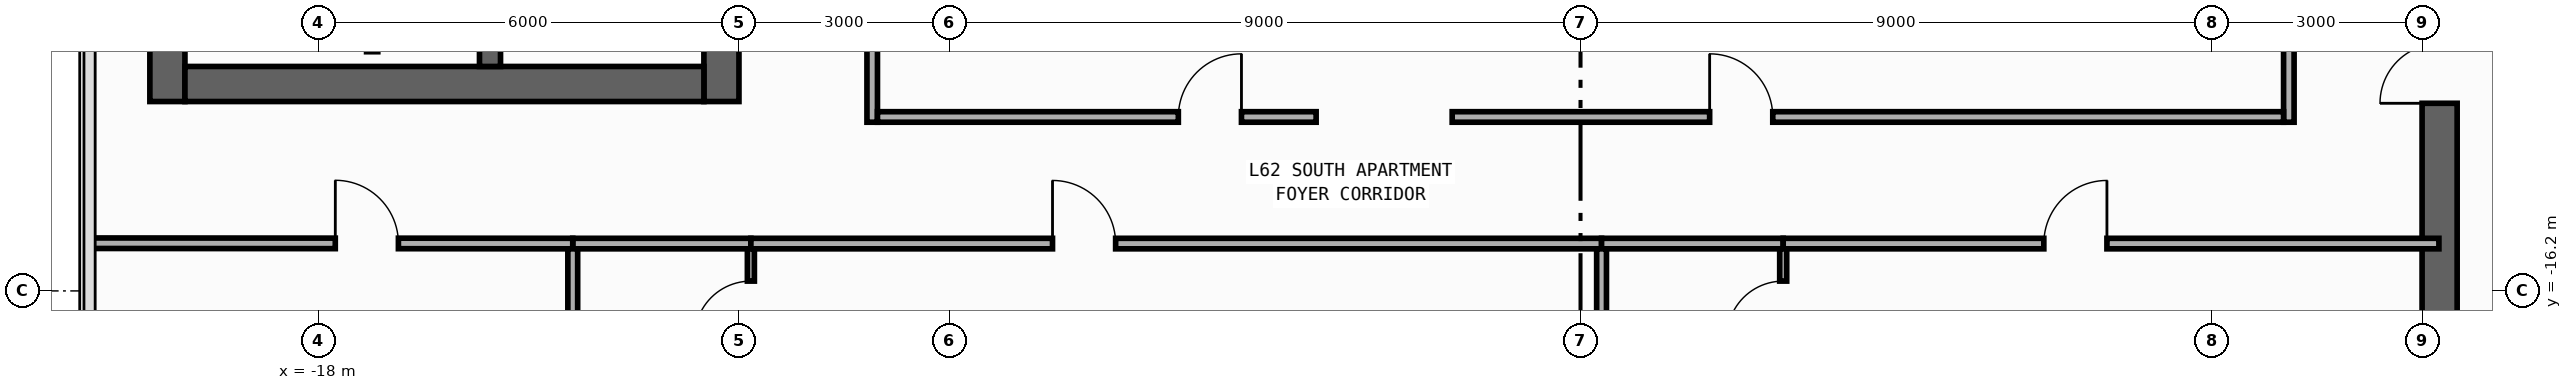
"""IFC4 building model, lengths in metres.
Left out: names, types, materials, properties, quantities, classifications, styles, units other than length and angle.
Written with IfcOpenShell. Run it as: python <this file> out.ifc"""

import sys

from ifc_helpers import new_model, si_unit, direction, frame, frame_2d, origin, place, context, subcontext, project, spatial, rectangle, extrude, element, fill, save


model = new_model("IFC4")
c1 = context("Model", 3, precision=1e-05, world=origin(), true_north=direction((0.0, 1.0)))
c2 = subcontext(c1, "Body", "Model", "MODEL_VIEW")
j1 = project(units=[si_unit("LENGTHUNIT", "METRE"), si_unit("PLANEANGLEUNIT", "RADIAN")], contexts=[c1])
p1 = place(None, origin())
s1 = spatial("IfcSite", under=j1, at=p1, CompositionType="ELEMENT")
p2 = place(p1, origin())
s2 = spatial("IfcBuilding", under=s1, at=p2, CompositionType="ELEMENT")
p3 = place(p2, frame((0.0, 0.0, 262.0)))
s3 = spatial("IfcBuildingStorey", under=s2, at=p3, CompositionType="ELEMENT", Elevation=262.0)
p4 = place(p3, frame((-20.15, -13.5, 0.0), z_axis=(0.0, 0.0, 1.0), x_axis=(0.0, 1.0, 0.0)))
e1 = element("IfcWall", 1, at=p4, inside=s3, PredefinedType="SHEAR", context=c2, shape_type="SweptSolid", body=[
    extrude(rectangle(XDim=27.0, YDim=0.5, at=frame_2d((13.5, 0.0))), origin(), (0.0, 0.0, 1.0), 3.34),
])
p5 = place(p3, frame((-12.25, -13.5, 0.0), z_axis=(0.0, 0.0, 1.0), x_axis=(0.0, 1.0, 0.0)))
e2 = element("IfcWall", 2, at=p5, inside=s3, PredefinedType="SHEAR", context=c2, shape_type="SweptSolid", body=[
    extrude(rectangle(XDim=27.0, YDim=0.5, at=frame_2d((13.5, 0.0))), origin(), (0.0, 0.0, 1.0), 3.34),
])
p6 = place(p5, frame((15.175, 0.0, 0.0)))
e3 = element("IfcOpeningElement", 3, at=p6, cuts=e2, PredefinedType="OPENING", context=c2, shape_type="SweptSolid", body=[
    extrude(rectangle(XDim=0.85, YDim=2.1, at=frame_2d((0.425, 1.05))), frame((0.0, 0.26, 0.0), z_axis=(0.0, -1.0, 0.0), x_axis=(1.0, 0.0, 0.0)), (0.0, 0.0, 1.0), 0.52),
])
p7 = place(p5, frame((21.275, 0.0, 0.0)))
e4 = element("IfcOpeningElement", 4, at=p7, cuts=e2, PredefinedType="OPENING", context=c2, shape_type="SweptSolid", body=[
    extrude(rectangle(XDim=0.85, YDim=2.1, at=frame_2d((0.425, 1.05))), frame((0.0, 0.26, 0.0), z_axis=(0.0, -1.0, 0.0), x_axis=(1.0, 0.0, 0.0)), (0.0, 0.0, 1.0), 0.52),
])
p8 = place(p5, frame((4.275, 0.0, 0.0)))
e5 = element("IfcOpeningElement", 5, at=p8, cuts=e2, PredefinedType="OPENING", context=c2, shape_type="SweptSolid", body=[
    extrude(rectangle(XDim=0.85, YDim=2.1, at=frame_2d((0.425, 1.05))), frame((0.0, 0.26, 0.0), z_axis=(0.0, -1.0, 0.0), x_axis=(1.0, 0.0, 0.0)), (0.0, 0.0, 1.0), 0.52),
])
p9 = place(p5, frame((10.275, 0.0, 0.0)))
e6 = element("IfcOpeningElement", 6, at=p9, cuts=e2, PredefinedType="OPENING", context=c2, shape_type="SweptSolid", body=[
    extrude(rectangle(XDim=0.85, YDim=2.1, at=frame_2d((0.425, 1.05))), frame((0.0, 0.26, 0.0), z_axis=(0.0, -1.0, 0.0), x_axis=(1.0, 0.0, 0.0)), (0.0, 0.0, 1.0), 0.52),
])
p10 = place(p5, frame((12.725, 0.0, 0.0)))
e7 = element("IfcOpeningElement", 7, at=p10, cuts=e2, PredefinedType="OPENING", context=c2, shape_type="SweptSolid", body=[
    extrude(rectangle(XDim=1.15, YDim=2.2, at=frame_2d((0.575, 1.1))), frame((0.0, 0.26, 0.0), z_axis=(0.0, -1.0, 0.0), x_axis=(1.0, 0.0, 0.0)), (0.0, 0.0, 1.0), 0.52),
])
p11 = place(p5, frame((1.625, 0.0, 0.0)))
e8 = element("IfcOpeningElement", 8, at=p11, cuts=e2, PredefinedType="OPENING", context=c2, shape_type="SweptSolid", body=[
    extrude(rectangle(XDim=0.85, YDim=2.1, at=frame_2d((0.425, 1.05))), frame((0.0, 0.26, 0.0), z_axis=(0.0, -1.0, 0.0), x_axis=(1.0, 0.0, 0.0)), (0.0, 0.0, 1.0), 0.52),
])
p12 = place(p3, frame((-19.9, -13.25, 0.0), z_axis=(0.0, 0.0, 1.0), x_axis=(1.0, 0.0, 0.0)))
e9 = element("IfcWall", 9, at=p12, inside=s3, PredefinedType="SHEAR", context=c2, shape_type="SweptSolid", body=[
    extrude(rectangle(XDim=7.4, YDim=0.5, at=frame_2d((3.7, 0.0))), origin(), (0.0, 0.0, 1.0), 3.34),
])
p13 = place(p3, frame((-15.55, -13.0, 0.0), z_axis=(0.0, 0.0, 1.0), x_axis=(0.0, 1.0, 0.0)))
e10 = element("IfcWall", 10, at=p13, inside=s3, PredefinedType="SHEAR", context=c2, shape_type="SweptSolid", body=[
    extrude(rectangle(XDim=26.0, YDim=0.3, at=frame_2d((13.0, 0.0))), origin(), (0.0, 0.0, 1.0), 3.34),
])
p14 = place(p13, frame((12.225, 0.0, 0.0)))
e11 = element("IfcOpeningElement", 11, at=p14, cuts=e10, PredefinedType="OPENING", context=c2, shape_type="SweptSolid", body=[
    extrude(rectangle(XDim=1.15, YDim=2.2, at=frame_2d((0.575, 1.1))), frame((0.0, 0.16, 0.0), z_axis=(0.0, -1.0, 0.0), x_axis=(1.0, 0.0, 0.0)), (0.0, 0.0, 1.0), 0.32),
])
p15 = place(p13, frame((1.125, 0.0, 0.0)))
e12 = element("IfcOpeningElement", 12, at=p15, cuts=e10, PredefinedType="OPENING", context=c2, shape_type="SweptSolid", body=[
    extrude(rectangle(XDim=0.85, YDim=2.1, at=frame_2d((0.425, 1.05))), frame((0.0, 0.16, 0.0), z_axis=(0.0, -1.0, 0.0), x_axis=(1.0, 0.0, 0.0)), (0.0, 0.0, 1.0), 0.32),
])
p16 = place(p3, frame((12.25, -19.8, 0.0), z_axis=(0.0, 0.0, 1.0), x_axis=(0.0, 1.0, 0.0)))
e13 = element("IfcWall", 13, at=p16, inside=s3, PredefinedType="SHEAR", context=c2, shape_type="SweptSolid", body=[
    extrude(rectangle(XDim=27.0, YDim=0.5, at=frame_2d((13.5, 0.0))), origin(), (0.0, 0.0, 1.0), 3.34),
])
p17 = place(p16, frame((23.05, 0.0, 0.0)))
e14 = element("IfcOpeningElement", 14, at=p17, cuts=e13, PredefinedType="OPENING", context=c2, shape_type="SweptSolid", body=[
    extrude(rectangle(XDim=1.1, YDim=2.2, at=frame_2d((0.55, 1.1))), frame((0.0, 0.26, 0.0), z_axis=(0.0, -1.0, 0.0), x_axis=(1.0, 0.0, 0.0)), (0.0, 0.0, 1.0), 0.52),
])
p18 = place(p16, frame((19.85, 0.0, 0.0)))
e15 = element("IfcOpeningElement", 15, at=p18, cuts=e13, PredefinedType="OPENING", context=c2, shape_type="SweptSolid", body=[
    extrude(rectangle(XDim=1.1, YDim=2.2, at=frame_2d((0.55, 1.1))), frame((0.0, 0.26, 0.0), z_axis=(0.0, -1.0, 0.0), x_axis=(1.0, 0.0, 0.0)), (0.0, 0.0, 1.0), 0.52),
])
p19 = place(p16, frame((16.65, 0.0, 0.0)))
e16 = element("IfcOpeningElement", 16, at=p19, cuts=e13, PredefinedType="OPENING", context=c2, shape_type="SweptSolid", body=[
    extrude(rectangle(XDim=1.1, YDim=2.2, at=frame_2d((0.55, 1.1))), frame((0.0, 0.26, 0.0), z_axis=(0.0, -1.0, 0.0), x_axis=(1.0, 0.0, 0.0)), (0.0, 0.0, 1.0), 0.52),
])
p20 = place(p16, frame((6.275, 0.0, 0.0)))
e17 = element("IfcOpeningElement", 17, at=p20, cuts=e13, PredefinedType="OPENING", context=c2, shape_type="SweptSolid", body=[
    extrude(rectangle(XDim=0.85, YDim=2.1, at=frame_2d((0.425, 1.05))), frame((0.0, 0.26, 0.0), z_axis=(0.0, -1.0, 0.0), x_axis=(1.0, 0.0, 0.0)), (0.0, 0.0, 1.0), 0.52),
])
p21 = place(p16, frame((8.575, 0.0, 0.0)))
e18 = element("IfcOpeningElement", 18, at=p21, cuts=e13, PredefinedType="OPENING", context=c2, shape_type="SweptSolid", body=[
    extrude(rectangle(XDim=0.85, YDim=2.1, at=frame_2d((0.425, 1.05))), frame((0.0, 0.26, 0.0), z_axis=(0.0, -1.0, 0.0), x_axis=(1.0, 0.0, 0.0)), (0.0, 0.0, 1.0), 0.52),
])
p22 = place(p16, frame((10.675, 0.0, 0.0)))
e19 = element("IfcOpeningElement", 19, at=p22, cuts=e13, PredefinedType="OPENING", context=c2, shape_type="SweptSolid", body=[
    extrude(rectangle(XDim=0.85, YDim=2.1, at=frame_2d((0.425, 1.05))), frame((0.0, 0.26, 0.0), z_axis=(0.0, -1.0, 0.0), x_axis=(1.0, 0.0, 0.0)), (0.0, 0.0, 1.0), 0.52),
])
p23 = place(p16, frame((12.725, 0.0, 0.0)))
e20 = element("IfcOpeningElement", 20, at=p23, cuts=e13, PredefinedType="OPENING", context=c2, shape_type="SweptSolid", body=[
    extrude(rectangle(XDim=1.15, YDim=2.2, at=frame_2d((0.575, 1.1))), frame((0.0, 0.26, 0.0), z_axis=(0.0, -1.0, 0.0), x_axis=(1.0, 0.0, 0.0)), (0.0, 0.0, 1.0), 0.52),
])
p24 = place(p16, frame((25.125, 0.0, 0.0)))
e21 = element("IfcOpeningElement", 21, at=p24, cuts=e13, PredefinedType="OPENING", context=c2, shape_type="SweptSolid", body=[
    extrude(rectangle(XDim=0.85, YDim=2.1, at=frame_2d((0.425, 1.05))), frame((0.0, 0.26, 0.0), z_axis=(0.0, -1.0, 0.0), x_axis=(1.0, 0.0, 0.0)), (0.0, 0.0, 1.0), 0.52),
])
p25 = place(p3, frame((-10.1, -13.795, 0.0), z_axis=(0.0, 0.0, 1.0), x_axis=(0.0, 1.0, 0.0)))
e22 = element("IfcWall", 22, at=p25, inside=s3, PredefinedType="PARTITIONING", context=c2, shape_type="SweptSolid", body=[
    extrude(rectangle(XDim=10.205, YDim=0.15, at=frame_2d((5.103, 0.0))), origin(), (0.0, 0.0, 1.0), 3.34),
])
p26 = place(p25, frame((8.027, 0.0, 0.0)))
e23 = element("IfcOpeningElement", 23, at=p26, cuts=e22, PredefinedType="OPENING", context=c2, shape_type="SweptSolid", body=[
    extrude(rectangle(XDim=0.9, YDim=2.15, at=frame_2d((0.45, 1.075))), frame((0.0, 0.085, 0.0), z_axis=(0.0, -1.0, 0.0), x_axis=(1.0, 0.0, 0.0)), (0.0, 0.0, 1.0), 0.17),
])
p27 = place(p3, frame((10.1, -13.795, 0.0), z_axis=(0.0, 0.0, 1.0), x_axis=(0.0, 1.0, 0.0)))
e24 = element("IfcWall", 24, at=p27, inside=s3, PredefinedType="PARTITIONING", context=c2, shape_type="SweptSolid", body=[
    extrude(rectangle(XDim=7.575, YDim=0.15, at=frame_2d((3.788, 0.0))), origin(), (0.0, 0.0, 1.0), 3.34),
])
p28 = place(p27, frame((6.215, 0.0, 0.0)))
e25 = element("IfcOpeningElement", 25, at=p28, cuts=e24, PredefinedType="OPENING", context=c2, shape_type="SweptSolid", body=[
    extrude(rectangle(XDim=0.9, YDim=2.15, at=frame_2d((0.45, 1.075))), frame((0.0, 0.085, 0.0), z_axis=(0.0, -1.0, 0.0), x_axis=(1.0, 0.0, 0.0)), (0.0, 0.0, 1.0), 0.17),
])
p29 = place(p3, frame((-14.37, -15.525, 0.0), z_axis=(0.0, 0.0, 1.0), x_axis=(1.0, 0.0, 0.0)))
e26 = element("IfcWall", 26, at=p29, inside=s3, PredefinedType="PARTITIONING", context=c2, shape_type="SweptSolid", body=[
    extrude(rectangle(XDim=2.54, YDim=0.15, at=frame_2d((1.27, 0.0))), origin(), (0.0, 0.0, 1.0), 3.34),
])
p30 = place(p3, frame((-11.83, -15.525, 0.0), z_axis=(0.0, 0.0, 1.0), x_axis=(1.0, 0.0, 0.0)))
e27 = element("IfcWall", 27, at=p30, inside=s3, PredefinedType="PARTITIONING", context=c2, shape_type="SweptSolid", body=[
    extrude(rectangle(XDim=12.13, YDim=0.15, at=frame_2d((6.065, 0.0))), origin(), (0.0, 0.0, 1.0), 3.34),
])
p31 = place(p30, frame((4.301, 0.0, 0.0)))
e28 = element("IfcOpeningElement", 28, at=p31, cuts=e27, PredefinedType="OPENING", context=c2, shape_type="SweptSolid", body=[
    extrude(rectangle(XDim=0.9, YDim=2.15, at=frame_2d((0.45, 1.075))), frame((0.0, 0.085, 0.0), z_axis=(0.0, -1.0, 0.0), x_axis=(1.0, 0.0, 0.0)), (0.0, 0.0, 1.0), 0.17),
])
p32 = place(p3, frame((0.3, -15.525, 0.0), z_axis=(0.0, 0.0, 1.0), x_axis=(1.0, 0.0, 0.0)))
e29 = element("IfcWall", 29, at=p32, inside=s3, PredefinedType="PARTITIONING", context=c2, shape_type="SweptSolid", body=[
    extrude(rectangle(XDim=2.59, YDim=0.15, at=frame_2d((1.295, 0.0))), origin(), (0.0, 0.0, 1.0), 3.34),
])
p33 = place(p3, frame((2.89, -15.525, 0.0), z_axis=(0.0, 0.0, 1.0), x_axis=(1.0, 0.0, 0.0)))
e30 = element("IfcWall", 30, at=p33, inside=s3, PredefinedType="PARTITIONING", context=c2, shape_type="SweptSolid", body=[
    extrude(rectangle(XDim=9.35, YDim=0.15, at=frame_2d((4.675, 0.0))), origin(), (0.0, 0.0, 1.0), 3.34),
])
p34 = place(p33, frame((3.716, 0.0, 0.0)))
e31 = element("IfcOpeningElement", 31, at=p34, cuts=e30, PredefinedType="OPENING", context=c2, shape_type="SweptSolid", body=[
    extrude(rectangle(XDim=0.9, YDim=2.15, at=frame_2d((0.45, 1.075))), frame((0.0, 0.085, 0.0), z_axis=(0.0, -1.0, 0.0), x_axis=(1.0, 0.0, 0.0)), (0.0, 0.0, 1.0), 0.17),
])
p35 = place(p3, frame((-21.255, -15.52, 0.0), z_axis=(0.0, 0.0, 1.0), x_axis=(0.999999748504, -0.00070921968, 0.0)))
e32 = element("IfcWall", 32, at=p35, inside=s3, PredefinedType="PARTITIONING", context=c2, shape_type="SweptSolid", body=[
    extrude(rectangle(XDim=6.885, YDim=0.15, at=frame_2d((3.442, 0.0))), origin(), (0.0, 0.0, 1.0), 3.34),
])
p36 = place(p35, frame((3.499, 0.0, 0.0)))
e33 = element("IfcOpeningElement", 33, at=p36, cuts=e32, PredefinedType="OPENING", context=c2, shape_type="SweptSolid", body=[
    extrude(rectangle(XDim=0.9, YDim=2.15, at=frame_2d((0.45, 1.075))), frame((0.0, 0.085, 0.0), z_axis=(0.0, -1.0, 0.0), x_axis=(1.0, 0.0, 0.0)), (0.0, 0.0, 1.0), 0.17),
])
p37 = place(p3, frame((-10.025, -13.72, 0.0), z_axis=(0.0, 0.0, 1.0), x_axis=(1.0, 0.0, 0.0)))
e34 = element("IfcWall", 34, at=p37, inside=s3, PredefinedType="PARTITIONING", context=c2, shape_type="SweptSolid", body=[
    extrude(rectangle(XDim=6.255, YDim=0.15, at=frame_2d((3.127, 0.0))), origin(), (0.0, 0.0, 1.0), 3.34),
])
p38 = place(p37, frame((4.29, 0.0, 0.0)))
e35 = element("IfcOpeningElement", 35, at=p38, cuts=e34, PredefinedType="OPENING", context=c2, shape_type="SweptSolid", body=[
    extrude(rectangle(XDim=0.9, YDim=2.15, at=frame_2d((0.45, 1.075))), frame((0.0, 0.085, 0.0), z_axis=(0.0, -1.0, 0.0), x_axis=(1.0, 0.0, 0.0)), (0.0, 0.0, 1.0), 0.17),
])
p39 = place(p3, frame((-1.83, -13.72, 0.0), z_axis=(0.0, 0.0, 1.0), x_axis=(1.0, 0.0, 0.0)))
e36 = element("IfcWall", 36, at=p39, inside=s3, PredefinedType="PARTITIONING", context=c2, shape_type="SweptSolid", body=[
    extrude(rectangle(XDim=11.855, YDim=0.15, at=frame_2d((5.927, 0.0))), origin(), (0.0, 0.0, 1.0), 3.34),
])
p40 = place(p39, frame((3.671, 0.0, 0.0)))
e37 = element("IfcOpeningElement", 37, at=p40, cuts=e36, PredefinedType="OPENING", context=c2, shape_type="SweptSolid", body=[
    extrude(rectangle(XDim=0.9, YDim=2.15, at=frame_2d((0.45, 1.075))), frame((0.0, 0.085, 0.0), z_axis=(0.0, -1.0, 0.0), x_axis=(1.0, 0.0, 0.0)), (0.0, 0.0, 1.0), 0.17),
])
p41 = place(p3, frame((-11.83, -18.1, 0.0), z_axis=(0.0, 0.0, 1.0), x_axis=(0.0, 1.0, 0.0)))
e38 = element("IfcWall", 38, at=p41, inside=s3, PredefinedType="PARTITIONING", context=c2, shape_type="SweptSolid", body=[
    extrude(rectangle(XDim=2.5, YDim=0.1, at=frame_2d((1.25, 0.0))), origin(), (0.0, 0.0, 1.0), 3.34),
])
p42 = place(p41, frame((1.24, 0.0, 0.0)))
e39 = element("IfcOpeningElement", 39, at=p42, cuts=e38, PredefinedType="OPENING", context=c2, shape_type="SweptSolid", body=[
    extrude(rectangle(XDim=0.8, YDim=2.1, at=frame_2d((0.4, 1.05))), frame((0.0, 0.06, 0.0), z_axis=(0.0, -1.0, 0.0), x_axis=(1.0, 0.0, 0.0)), (0.0, 0.0, 1.0), 0.12),
])
p43 = place(p3, frame((-14.37, -18.1, 0.0), z_axis=(0.0, 0.0, 1.0), x_axis=(0.0, 1.0, 0.0)))
e40 = element("IfcWall", 40, at=p43, inside=s3, PredefinedType="PARTITIONING", context=c2, shape_type="SweptSolid", body=[
    extrude(rectangle(XDim=2.5, YDim=0.14, at=frame_2d((1.25, 0.0))), origin(), (0.0, 0.0, 1.0), 2.44),
])
p44 = place(p3, frame((0.3, -18.1, 0.0), z_axis=(0.0, 0.0, 1.0), x_axis=(0.0, 1.0, 0.0)))
e41 = element("IfcWall", 41, at=p44, inside=s3, PredefinedType="PARTITIONING", context=c2, shape_type="SweptSolid", body=[
    extrude(rectangle(XDim=2.5, YDim=0.14, at=frame_2d((1.25, 0.0))), origin(), (0.0, 0.0, 1.0), 3.34),
])
p45 = place(p3, frame((2.89, -18.1, 0.0), z_axis=(0.0, 0.0, 1.0), x_axis=(0.0, 1.0, 0.0)))
e42 = element("IfcWall", 42, at=p45, inside=s3, PredefinedType="PARTITIONING", context=c2, shape_type="SweptSolid", body=[
    extrude(rectangle(XDim=2.5, YDim=0.1, at=frame_2d((1.25, 0.0))), origin(), (0.0, 0.0, 1.0), 3.34),
])
p46 = place(p45, frame((1.24, 0.0, 0.0)))
e43 = element("IfcOpeningElement", 43, at=p46, cuts=e42, PredefinedType="OPENING", context=c2, shape_type="SweptSolid", body=[
    extrude(rectangle(XDim=0.8, YDim=2.1, at=frame_2d((0.4, 1.05))), frame((0.0, 0.06, 0.0), z_axis=(0.0, -1.0, 0.0), x_axis=(1.0, 0.0, 0.0)), (0.0, 0.0, 1.0), 0.12),
])
p47 = place(p20, origin())
e44 = element("IfcDoor", 44, at=p47, inside=s3, OperationType="SINGLE_SWING_LEFT", PredefinedType="DOOR", context=c2, shape_type="SweptSolid", body=[
    extrude(rectangle(XDim=0.85, YDim=2.1, at=frame_2d((0.425, 1.05))), frame((0.0, 0.025, 0.0), z_axis=(0.0, -1.0, 0.0), x_axis=(1.0, 0.0, 0.0)), (0.0, 0.0, 1.0), 0.05),
])
fill(e17, e44)
p48 = place(p31, origin())
e45 = element("IfcDoor", 45, at=p48, inside=s3, OperationType="SINGLE_SWING_LEFT", PredefinedType="DOOR", context=c2, shape_type="SweptSolid", body=[
    extrude(rectangle(XDim=0.9, YDim=2.15, at=frame_2d((0.45, 1.075))), frame((0.0, 0.025, 0.0), z_axis=(0.0, -1.0, 0.0), x_axis=(1.0, 0.0, 0.0)), (0.0, 0.0, 1.0), 0.05),
])
fill(e28, e45)
p49 = place(p34, origin())
e46 = element("IfcDoor", 46, at=p49, inside=s3, OperationType="SINGLE_SWING_RIGHT", PredefinedType="DOOR", context=c2, shape_type="SweptSolid", body=[
    extrude(rectangle(XDim=0.9, YDim=2.15, at=frame_2d((0.45, 1.075))), frame((0.0, 0.025, 0.0), z_axis=(0.0, -1.0, 0.0), x_axis=(1.0, 0.0, 0.0)), (0.0, 0.0, 1.0), 0.05),
])
fill(e31, e46)
p50 = place(p36, origin())
e47 = element("IfcDoor", 47, at=p50, inside=s3, OperationType="SINGLE_SWING_LEFT", PredefinedType="DOOR", context=c2, shape_type="SweptSolid", body=[
    extrude(rectangle(XDim=0.9, YDim=2.15, at=frame_2d((0.45, 1.075))), frame((0.0, 0.025, 0.0), z_axis=(0.0, -1.0, 0.0), x_axis=(1.0, 0.0, 0.0)), (0.0, 0.0, 1.0), 0.05),
])
fill(e33, e47)
p51 = place(p38, origin())
e48 = element("IfcDoor", 48, at=p51, inside=s3, OperationType="SINGLE_SWING_RIGHT", PredefinedType="DOOR", context=c2, shape_type="SweptSolid", body=[
    extrude(rectangle(XDim=0.9, YDim=2.15, at=frame_2d((0.45, 1.075))), frame((0.0, 0.025, 0.0), z_axis=(0.0, -1.0, 0.0), x_axis=(1.0, 0.0, 0.0)), (0.0, 0.0, 1.0), 0.05),
])
fill(e35, e48)
p52 = place(p40, origin())
e49 = element("IfcDoor", 49, at=p52, inside=s3, OperationType="SINGLE_SWING_LEFT", PredefinedType="DOOR", context=c2, shape_type="SweptSolid", body=[
    extrude(rectangle(XDim=0.9, YDim=2.15, at=frame_2d((0.45, 1.075))), frame((0.0, 0.025, 0.0), z_axis=(0.0, -1.0, 0.0), x_axis=(1.0, 0.0, 0.0)), (0.0, 0.0, 1.0), 0.05),
])
fill(e37, e49)
p53 = place(p42, origin())
e50 = element("IfcDoor", 50, at=p53, inside=s3, OperationType="SINGLE_SWING_LEFT", PredefinedType="DOOR", context=c2, shape_type="SweptSolid", body=[
    extrude(rectangle(XDim=0.8, YDim=2.1, at=frame_2d((0.4, 1.05))), frame((0.0, 0.025, 0.0), z_axis=(0.0, -1.0, 0.0), x_axis=(1.0, 0.0, 0.0)), (0.0, 0.0, 1.0), 0.05),
])
fill(e39, e50)
p54 = place(p46, origin())
e51 = element("IfcDoor", 51, at=p54, inside=s3, OperationType="SINGLE_SWING_LEFT", PredefinedType="DOOR", context=c2, shape_type="SweptSolid", body=[
    extrude(rectangle(XDim=0.8, YDim=2.1, at=frame_2d((0.4, 1.05))), frame((0.0, 0.025, 0.0), z_axis=(0.0, -1.0, 0.0), x_axis=(1.0, 0.0, 0.0)), (0.0, 0.0, 1.0), 0.05),
])
fill(e43, e51)
save(model, sys.argv[1])
